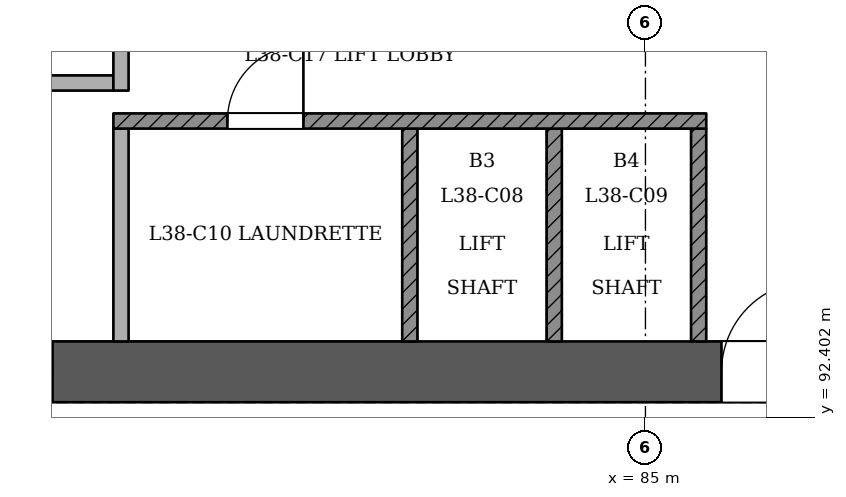
"""IFC4 building model, lengths in metres.
Left out: names, types, materials, properties, quantities, classifications, styles, units other than length and angle.
Written with IfcOpenShell. Run it as: python <this file> out.ifc"""

import sys

from ifc_helpers import new_model, si_unit, direction, frame, frame_2d, origin, place, context, subcontext, project, spatial, rectangle, extrude, element, fill, save


model = new_model("IFC4")
c1 = context("Model", 3, precision=1e-05, world=origin(), true_north=direction((0.0, 1.0)))
c2 = subcontext(c1, "Body", "Model", "MODEL_VIEW")
j1 = project(units=[si_unit("LENGTHUNIT", "METRE"), si_unit("PLANEANGLEUNIT", "RADIAN")], contexts=[c1])
p1 = place(None, origin())
s1 = spatial("IfcSite", under=j1, at=p1, CompositionType="ELEMENT")
p2 = place(p1, origin())
s2 = spatial("IfcBuilding", under=s1, at=p2, CompositionType="ELEMENT")
p3 = place(p2, frame((0.0, 0.0, 149.4)))
s3 = spatial("IfcBuildingStorey", under=s2, at=p3, CompositionType="ELEMENT", Elevation=149.4)
p4 = place(p3, frame((72.6, 93.0, 0.0), z_axis=(0.0, 0.0, 1.0), x_axis=(1.0, 0.0, 0.0)))
e1 = element("IfcWall", 1, at=p4, inside=s3, PredefinedType="SHEAR", context=c2, shape_type="SweptSolid", body=[
    extrude(rectangle(XDim=25.2, YDim=0.8, at=frame_2d((12.6, 0.0))), origin(), (0.0, 0.0, 1.0), 3.6),
])
p5 = place(p4, frame((1.2, 0.0, 0.0)))
e2 = element("IfcOpeningElement", 2, at=p5, cuts=e1, PredefinedType="OPENING", context=c2, shape_type="SweptSolid", body=[
    extrude(rectangle(XDim=1.2, YDim=2.1, at=frame_2d((0.6, 1.05))), frame((0.0, 0.411, 0.0), z_axis=(0.0, -1.0, 0.0), x_axis=(1.0, 0.0, 0.0)), (0.0, 0.0, 1.0), 0.821),
])
p6 = place(p4, frame((3.4, 0.0, 0.0)))
e3 = element("IfcOpeningElement", 3, at=p6, cuts=e1, PredefinedType="OPENING", context=c2, shape_type="SweptSolid", body=[
    extrude(rectangle(XDim=1.2, YDim=2.1, at=frame_2d((0.6, 1.05))), frame((0.0, 0.411, 0.0), z_axis=(0.0, -1.0, 0.0), x_axis=(1.0, 0.0, 0.0)), (0.0, 0.0, 1.0), 0.821),
])
p7 = place(p4, frame((13.4, 0.0, 0.0)))
e4 = element("IfcOpeningElement", 4, at=p7, cuts=e1, PredefinedType="OPENING", context=c2, shape_type="SweptSolid", body=[
    extrude(rectangle(XDim=1.2, YDim=2.1, at=frame_2d((0.6, 1.05))), frame((0.0, 0.411, 0.0), z_axis=(0.0, -1.0, 0.0), x_axis=(1.0, 0.0, 0.0)), (0.0, 0.0, 1.0), 0.821),
])
p8 = place(p4, frame((15.462, 0.0, 0.0)))
e5 = element("IfcOpeningElement", 5, at=p8, cuts=e1, PredefinedType="OPENING", context=c2, shape_type="SweptSolid", body=[
    extrude(rectangle(XDim=1.0, YDim=2.1, at=frame_2d((0.5, 1.05))), frame((0.0, 0.411, 0.0), z_axis=(0.0, -1.0, 0.0), x_axis=(1.0, 0.0, 0.0)), (0.0, 0.0, 1.0), 0.821),
])
p9 = place(p4, frame((17.7, 0.0, 0.0)))
e6 = element("IfcOpeningElement", 6, at=p9, cuts=e1, PredefinedType="OPENING", context=c2, shape_type="SweptSolid", body=[
    extrude(rectangle(XDim=1.0, YDim=2.1, at=frame_2d((0.5, 1.05))), frame((0.0, 0.411, 0.0), z_axis=(0.0, -1.0, 0.0), x_axis=(1.0, 0.0, 0.0)), (0.0, 0.0, 1.0), 0.821),
])
p10 = place(p4, frame((20.25, 0.0, 0.0)))
e7 = element("IfcOpeningElement", 7, at=p10, cuts=e1, PredefinedType="OPENING", context=c2, shape_type="SweptSolid", body=[
    extrude(rectangle(XDim=1.0, YDim=2.1, at=frame_2d((0.5, 1.05))), frame((0.0, 0.411, 0.0), z_axis=(0.0, -1.0, 0.0), x_axis=(1.0, 0.0, 0.0)), (0.0, 0.0, 1.0), 0.821),
])
p11 = place(p4, frame((22.738, 0.0, 0.0)))
e8 = element("IfcOpeningElement", 8, at=p11, cuts=e1, PredefinedType="OPENING", context=c2, shape_type="SweptSolid", body=[
    extrude(rectangle(XDim=1.0, YDim=2.1, at=frame_2d((0.5, 1.05))), frame((0.0, 0.411, 0.0), z_axis=(0.0, -1.0, 0.0), x_axis=(1.0, 0.0, 0.0)), (0.0, 0.0, 1.0), 0.821),
])
p12 = place(p3, frame((65.324, 98.5, 0.0), z_axis=(0.0, 0.0, 1.0), x_axis=(0.500001898363, -0.866024307761, 0.0)))
e9 = element("IfcWall", 9, at=p12, inside=s3, PredefinedType="PARTITIONING", context=c2, shape_type="SweptSolid", body=[
    extrude(rectangle(XDim=39.351, YDim=0.15, at=frame_2d((19.675, 0.0))), origin(), (0.0, 0.0, 1.0), 2.75),
])
p13 = place(p12, frame((0.2, 0.0, 0.0)))
e10 = element("IfcOpeningElement", 10, at=p13, cuts=e9, PredefinedType="OPENING", context=c2, shape_type="SweptSolid", body=[
    extrude(rectangle(XDim=1.2, YDim=2.1, at=frame_2d((0.6, 1.05))), frame((0.0, 0.085, 0.0), z_axis=(0.0, -1.0, 0.0), x_axis=(1.0, 0.0, 0.0)), (0.0, 0.0, 1.0), 0.171),
])
p14 = place(p12, frame((3.425, 0.0, 0.0)))
e11 = element("IfcOpeningElement", 11, at=p14, cuts=e9, PredefinedType="OPENING", context=c2, shape_type="SweptSolid", body=[
    extrude(rectangle(XDim=1.0, YDim=2.1, at=frame_2d((0.5, 1.05))), frame((0.0, 0.085, 0.0), z_axis=(0.0, -1.0, 0.0), x_axis=(1.0, 0.0, 0.0)), (0.0, 0.0, 1.0), 0.171),
])
p15 = place(p12, frame((9.004, 0.0, 0.0)))
e12 = element("IfcOpeningElement", 12, at=p15, cuts=e9, PredefinedType="OPENING", context=c2, shape_type="SweptSolid", body=[
    extrude(rectangle(XDim=1.1, YDim=2.1, at=frame_2d((0.55, 1.05))), frame((0.0, 0.085, 0.0), z_axis=(0.0, -1.0, 0.0), x_axis=(1.0, 0.0, 0.0)), (0.0, 0.0, 1.0), 0.171),
])
p16 = place(p12, frame((11.396, 0.0, 0.0)))
e13 = element("IfcOpeningElement", 13, at=p16, cuts=e9, PredefinedType="OPENING", context=c2, shape_type="SweptSolid", body=[
    extrude(rectangle(XDim=1.0, YDim=2.1, at=frame_2d((0.5, 1.05))), frame((0.0, 0.085, 0.0), z_axis=(0.0, -1.0, 0.0), x_axis=(1.0, 0.0, 0.0)), (0.0, 0.0, 1.0), 0.171),
])
p17 = place(p12, frame((17.955, 0.0, 0.0)))
e14 = element("IfcOpeningElement", 14, at=p17, cuts=e9, PredefinedType="OPENING", context=c2, shape_type="SweptSolid", body=[
    extrude(rectangle(XDim=1.0, YDim=2.1, at=frame_2d((0.5, 1.05))), frame((0.0, 0.085, 0.0), z_axis=(0.0, -1.0, 0.0), x_axis=(1.0, 0.0, 0.0)), (0.0, 0.0, 1.0), 0.171),
])
p18 = place(p12, frame((20.396, 0.0, 0.0)))
e15 = element("IfcOpeningElement", 15, at=p18, cuts=e9, PredefinedType="OPENING", context=c2, shape_type="SweptSolid", body=[
    extrude(rectangle(XDim=1.0, YDim=2.1, at=frame_2d((0.5, 1.05))), frame((0.0, 0.085, 0.0), z_axis=(0.0, -1.0, 0.0), x_axis=(1.0, 0.0, 0.0)), (0.0, 0.0, 1.0), 0.171),
])
p19 = place(p12, frame((26.955, 0.0, 0.0)))
e16 = element("IfcOpeningElement", 16, at=p19, cuts=e9, PredefinedType="OPENING", context=c2, shape_type="SweptSolid", body=[
    extrude(rectangle(XDim=1.0, YDim=2.1, at=frame_2d((0.5, 1.05))), frame((0.0, 0.085, 0.0), z_axis=(0.0, -1.0, 0.0), x_axis=(1.0, 0.0, 0.0)), (0.0, 0.0, 1.0), 0.171),
])
p20 = place(p12, frame((29.396, 0.0, 0.0)))
e17 = element("IfcOpeningElement", 17, at=p20, cuts=e9, PredefinedType="OPENING", context=c2, shape_type="SweptSolid", body=[
    extrude(rectangle(XDim=1.0, YDim=2.1, at=frame_2d((0.5, 1.05))), frame((0.0, 0.085, 0.0), z_axis=(0.0, -1.0, 0.0), x_axis=(1.0, 0.0, 0.0)), (0.0, 0.0, 1.0), 0.171),
])
p21 = place(p12, frame((36.004, 0.0, 0.0)))
e18 = element("IfcOpeningElement", 18, at=p21, cuts=e9, PredefinedType="OPENING", context=c2, shape_type="SweptSolid", body=[
    extrude(rectangle(XDim=1.1, YDim=2.1, at=frame_2d((0.55, 1.05))), frame((0.0, 0.085, 0.0), z_axis=(0.0, -1.0, 0.0), x_axis=(1.0, 0.0, 0.0)), (0.0, 0.0, 1.0), 0.171),
])
p22 = place(p3, frame((85.065, 64.534, 0.0), z_axis=(0.0, 0.0, 1.0), x_axis=(0.500002644497, 0.866023876978, 0.0)))
e19 = element("IfcWall", 19, at=p22, inside=s3, PredefinedType="PARTITIONING", context=c2, shape_type="SweptSolid", body=[
    extrude(rectangle(XDim=39.221, YDim=0.15, at=frame_2d((19.61, 0.0))), origin(), (0.0, 0.0, 1.0), 2.75),
])
p23 = place(p22, frame((0.506, 0.0, 0.0)))
e20 = element("IfcOpeningElement", 20, at=p23, cuts=e19, PredefinedType="OPENING", context=c2, shape_type="SweptSolid", body=[
    extrude(rectangle(XDim=1.2, YDim=2.1, at=frame_2d((0.6, 1.05))), frame((0.0, 0.085, 0.0), z_axis=(0.0, -1.0, 0.0), x_axis=(1.0, 0.0, 0.0)), (0.0, 0.0, 1.0), 0.171),
])
p24 = place(p22, frame((8.825, 0.0, 0.0)))
e21 = element("IfcOpeningElement", 21, at=p24, cuts=e19, PredefinedType="OPENING", context=c2, shape_type="SweptSolid", body=[
    extrude(rectangle(XDim=1.0, YDim=2.1, at=frame_2d((0.5, 1.05))), frame((0.0, 0.085, 0.0), z_axis=(0.0, -1.0, 0.0), x_axis=(1.0, 0.0, 0.0)), (0.0, 0.0, 1.0), 0.171),
])
p25 = place(p22, frame((11.266, 0.0, 0.0)))
e22 = element("IfcOpeningElement", 22, at=p25, cuts=e19, PredefinedType="OPENING", context=c2, shape_type="SweptSolid", body=[
    extrude(rectangle(XDim=1.0, YDim=2.1, at=frame_2d((0.5, 1.05))), frame((0.0, 0.085, 0.0), z_axis=(0.0, -1.0, 0.0), x_axis=(1.0, 0.0, 0.0)), (0.0, 0.0, 1.0), 0.171),
])
p26 = place(p22, frame((17.825, 0.0, 0.0)))
e23 = element("IfcOpeningElement", 23, at=p26, cuts=e19, PredefinedType="OPENING", context=c2, shape_type="SweptSolid", body=[
    extrude(rectangle(XDim=1.0, YDim=2.1, at=frame_2d((0.5, 1.05))), frame((0.0, 0.085, 0.0), z_axis=(0.0, -1.0, 0.0), x_axis=(1.0, 0.0, 0.0)), (0.0, 0.0, 1.0), 0.171),
])
p27 = place(p22, frame((20.266, 0.0, 0.0)))
e24 = element("IfcOpeningElement", 24, at=p27, cuts=e19, PredefinedType="OPENING", context=c2, shape_type="SweptSolid", body=[
    extrude(rectangle(XDim=1.0, YDim=2.1, at=frame_2d((0.5, 1.05))), frame((0.0, 0.085, 0.0), z_axis=(0.0, -1.0, 0.0), x_axis=(1.0, 0.0, 0.0)), (0.0, 0.0, 1.0), 0.171),
])
p28 = place(p22, frame((26.825, 0.0, 0.0)))
e25 = element("IfcOpeningElement", 25, at=p28, cuts=e19, PredefinedType="OPENING", context=c2, shape_type="SweptSolid", body=[
    extrude(rectangle(XDim=1.0, YDim=2.1, at=frame_2d((0.5, 1.05))), frame((0.0, 0.085, 0.0), z_axis=(0.0, -1.0, 0.0), x_axis=(1.0, 0.0, 0.0)), (0.0, 0.0, 1.0), 0.171),
])
p29 = place(p22, frame((30.296, 0.0, 0.0)))
e26 = element("IfcOpeningElement", 26, at=p29, cuts=e19, PredefinedType="OPENING", context=c2, shape_type="SweptSolid", body=[
    extrude(rectangle(XDim=1.0, YDim=2.1, at=frame_2d((0.5, 1.05))), frame((0.0, 0.085, 0.0), z_axis=(0.0, -1.0, 0.0), x_axis=(1.0, 0.0, 0.0)), (0.0, 0.0, 1.0), 0.171),
])
p30 = place(p22, frame((35.875, 0.0, 0.0)))
e27 = element("IfcOpeningElement", 27, at=p30, cuts=e19, PredefinedType="OPENING", context=c2, shape_type="SweptSolid", body=[
    extrude(rectangle(XDim=1.1, YDim=2.1, at=frame_2d((0.55, 1.05))), frame((0.0, 0.085, 0.0), z_axis=(0.0, -1.0, 0.0), x_axis=(1.0, 0.0, 0.0)), (0.0, 0.0, 1.0), 0.171),
])
p31 = place(p22, frame((37.821, 0.0, 0.0)))
e28 = element("IfcOpeningElement", 28, at=p31, cuts=e19, PredefinedType="OPENING", context=c2, shape_type="SweptSolid", body=[
    extrude(rectangle(XDim=1.2, YDim=2.1, at=frame_2d((0.6, 1.05))), frame((0.0, 0.085, 0.0), z_axis=(0.0, -1.0, 0.0), x_axis=(1.0, 0.0, 0.0)), (0.0, 0.0, 1.0), 0.171),
])
p32 = place(p3, frame((78.1, 93.4, 0.0), z_axis=(0.0, 0.0, 1.0), x_axis=(0.0, 1.0, 0.0)))
e29 = element("IfcWall", 29, at=p32, inside=s3, PredefinedType="PARTITIONING", context=c2, shape_type="SweptSolid", body=[
    extrude(rectangle(XDim=2.8, YDim=0.2, at=frame_2d((1.4, 0.0))), origin(), (0.0, 0.0, 1.0), 3.15),
])
for number, where, z_axis, x_axis in (
    (30, (81.9, 93.4, 0.0), (0.0, 0.0, 1.0), (0.0, 1.0, 0.0)),
    (31, (83.8, 93.4, 0.0), (0.0, 0.0, 1.0), (0.0, 1.0, 0.0)),
    (32, (85.7, 93.4, 0.0), (0.0, 0.0, 1.0), (0.0, 1.0, 0.0)),
):
    element("IfcWall", number, at=place(p3, frame(where, z_axis=z_axis, x_axis=x_axis)), inside=s3, PredefinedType="SOLIDWALL", context=c2, shape_type="SweptSolid", body=[
        extrude(rectangle(XDim=2.8, YDim=0.2, at=frame_2d((1.4, 0.0))), origin(), (0.0, 0.0, 1.0), 3.15),
    ])
p33 = place(p3, frame((78.0, 96.3, 0.0), z_axis=(0.0, 0.0, 1.0), x_axis=(1.0, 0.0, 0.0)))
e33 = element("IfcWall", 33, at=p33, inside=s3, PredefinedType="SOLIDWALL", context=c2, shape_type="SweptSolid", body=[
    extrude(rectangle(XDim=7.8, YDim=0.2, at=frame_2d((3.9, 0.0))), origin(), (0.0, 0.0, 1.0), 3.15),
])
p34 = place(p33, frame((1.5, 0.0, 0.0)))
e34 = element("IfcOpeningElement", 34, at=p34, cuts=e33, PredefinedType="OPENING", context=c2, shape_type="SweptSolid", body=[
    extrude(rectangle(XDim=1.0, YDim=2.1, at=frame_2d((0.5, 1.05))), frame((0.0, 0.11, 0.0), z_axis=(0.0, -1.0, 0.0), x_axis=(1.0, 0.0, 0.0)), (0.0, 0.0, 1.0), 0.221),
])
p35 = place(p3, frame((76.1, 96.8, 0.0), z_axis=(0.0, 0.0, 1.0), x_axis=(1.0, 0.0, 0.0)))
e35 = element("IfcWall", 35, at=p35, inside=s3, PredefinedType="PARTITIONING", context=c2, shape_type="SweptSolid", body=[
    extrude(rectangle(XDim=1.9, YDim=0.2, at=frame_2d((0.95, 0.0))), origin(), (0.0, 0.0, 1.0), 3.15),
])
p36 = place(p3, frame((78.1, 96.7, 0.0), z_axis=(0.0, 0.0, 1.0), x_axis=(0.0, 1.0, 0.0)))
e36 = element("IfcWall", 36, at=p36, inside=s3, PredefinedType="PARTITIONING", context=c2, shape_type="SweptSolid", body=[
    extrude(rectangle(XDim=3.7, YDim=0.2, at=frame_2d((1.85, 0.0))), origin(), (0.0, 0.0, 1.0), 3.15),
])
p37 = place(p36, frame((1.95, 0.0, 0.0)))
e37 = element("IfcOpeningElement", 37, at=p37, cuts=e36, PredefinedType="OPENING", context=c2, shape_type="SweptSolid", body=[
    extrude(rectangle(XDim=1.1, YDim=2.1, at=frame_2d((0.55, 1.05))), frame((0.0, 0.11, 0.0), z_axis=(0.0, -1.0, 0.0), x_axis=(1.0, 0.0, 0.0)), (0.0, 0.0, 1.0), 0.221),
])
p38 = place(p6, origin())
e38 = element("IfcDoor", 38, at=p38, inside=s3, OperationType="SINGLE_SWING_LEFT", PredefinedType="NOTDEFINED", context=c2, shape_type="SweptSolid", body=[
    extrude(rectangle(XDim=1.2, YDim=2.1, at=frame_2d((0.6, 1.05))), frame((0.0, 0.025, 0.0), z_axis=(0.0, -1.0, 0.0), x_axis=(1.0, 0.0, 0.0)), (0.0, 0.0, 1.0), 0.05),
])
fill(e3, e38)
p39 = place(p7, origin())
e39 = element("IfcDoor", 39, at=p39, inside=s3, OperationType="SINGLE_SWING_RIGHT", PredefinedType="NOTDEFINED", context=c2, shape_type="SweptSolid", body=[
    extrude(rectangle(XDim=1.2, YDim=2.1, at=frame_2d((0.6, 1.05))), frame((0.0, 0.025, 0.0), z_axis=(0.0, -1.0, 0.0), x_axis=(1.0, 0.0, 0.0)), (0.0, 0.0, 1.0), 0.05),
])
fill(e4, e39)
p40 = place(p34, origin())
e40 = element("IfcDoor", 40, at=p40, inside=s3, OperationType="SINGLE_SWING_RIGHT", PredefinedType="NOTDEFINED", context=c2, shape_type="SweptSolid", body=[
    extrude(rectangle(XDim=1.0, YDim=2.1, at=frame_2d((0.5, 1.05))), frame((0.0, 0.025, 0.0), z_axis=(0.0, -1.0, 0.0), x_axis=(1.0, 0.0, 0.0)), (0.0, 0.0, 1.0), 0.05),
])
fill(e34, e40)
save(model, sys.argv[1])
